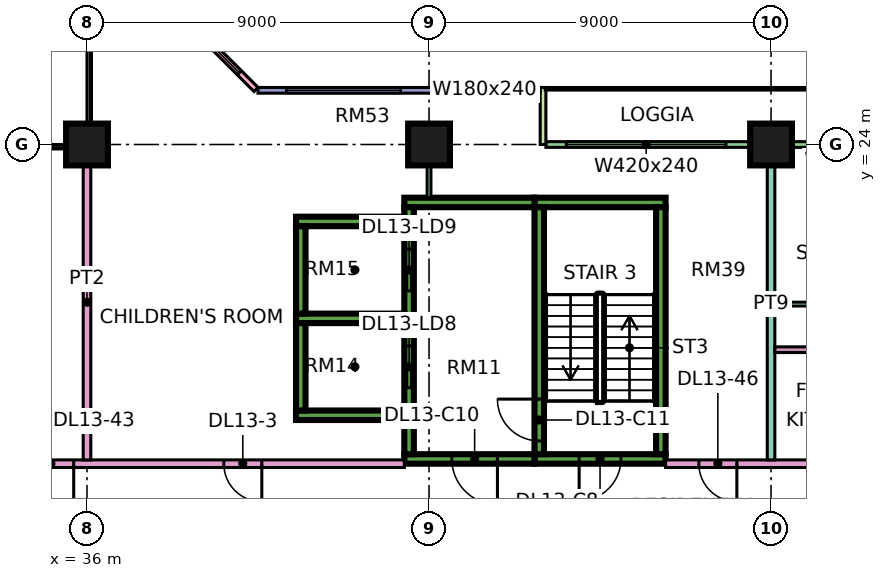
"""IFC4 building model, lengths in metres.
Left out: names, types, materials, properties, quantities, classifications, styles, units other than length and angle.
Written with IfcOpenShell. Run it as: python <this file> out.ifc"""

import sys

from ifc_helpers import new_model, si_unit, direction, frame, frame_2d, origin, origin_2d, place, context, subcontext, project, spatial, rectangle, extrude, element, fill, save


model = new_model("IFC4")
c1 = context("Model", 3, precision=1e-05, world=origin(), true_north=direction((0.0, 1.0)))
c2 = subcontext(c1, "Body", "Model", "MODEL_VIEW")
j1 = project(units=[si_unit("LENGTHUNIT", "METRE"), si_unit("PLANEANGLEUNIT", "RADIAN")], contexts=[c1])
p1 = place(None, origin())
s1 = spatial("IfcSite", under=j1, at=p1, CompositionType="ELEMENT")
p2 = place(p1, origin())
s2 = spatial("IfcBuilding", under=s1, at=p2, CompositionType="ELEMENT")
p3 = place(p2, frame((0.0, 0.0, 63.9)))
s3 = spatial("IfcBuildingStorey", under=s2, at=p3, CompositionType="ELEMENT", Elevation=63.9)
for number, where, z_axis, x_axis in (
    (1, (36.0, 24.0, 0.0), (0.0, 0.0, 1.0), (1.0, 0.0, 0.0)),
    (2, (45.0, 24.0, 0.0), (0.0, 0.0, 1.0), (1.0, 0.0, 0.0)),
    (3, (54.0, 24.0, 0.0), (0.0, 0.0, 1.0), (1.0, 0.0, 0.0)),
):
    element("IfcColumn", number, at=place(p3, frame(where, z_axis=z_axis, x_axis=x_axis)), inside=s3, PredefinedType="COLUMN", context=c2, shape_type="SweptSolid", body=[
        extrude(rectangle(XDim=1.1, YDim=1.1, at=origin_2d()), origin(), (0.0, 0.0, 1.0), 3.75),
    ])
p4 = place(p3, frame((47.775, 15.725, 0.0), z_axis=(0.0, 0.0, 1.0), x_axis=(1.0, 0.0, 0.0)))
e4 = element("IfcWall", 4, at=p4, inside=s3, PredefinedType="SHEAR", context=c2, shape_type="SweptSolid", body=[
    extrude(rectangle(XDim=3.45, YDim=0.25, at=frame_2d((1.725, 0.0))), origin(), (0.0, 0.0, 1.0), 3.75),
])
p5 = place(p4, frame((1.175, 0.0, 0.0)))
e5 = element("IfcOpeningElement", 5, at=p5, cuts=e4, PredefinedType="OPENING", context=c2, shape_type="SweptSolid", body=[
    extrude(rectangle(XDim=1.1, YDim=2.2, at=frame_2d((0.55, 1.1))), frame((0.0, 0.135, 0.0), z_axis=(0.0, -1.0, 0.0), x_axis=(1.0, 0.0, 0.0)), (0.0, 0.0, 1.0), 0.27),
])
p6 = place(p3, frame((47.775, 22.475, 0.0), z_axis=(0.0, 0.0, 1.0), x_axis=(1.0, 0.0, 0.0)))
e6 = element("IfcWall", 6, at=p6, inside=s3, PredefinedType="SHEAR", context=c2, shape_type="SweptSolid", body=[
    extrude(rectangle(XDim=3.45, YDim=0.25, at=frame_2d((1.725, 0.0))), origin(), (0.0, 0.0, 1.0), 3.75),
])
p7 = place(p3, frame((47.9, 15.85, 0.0), z_axis=(0.0, 0.0, 1.0), x_axis=(0.0, 1.0, 0.0)))
e7 = element("IfcWall", 7, at=p7, inside=s3, PredefinedType="SHEAR", context=c2, shape_type="SweptSolid", body=[
    extrude(rectangle(XDim=6.5, YDim=0.25, at=frame_2d((3.25, 0.0))), origin(), (0.0, 0.0, 1.0), 3.75),
])
p8 = place(p7, frame((0.35, 0.0, 0.0)))
e8 = element("IfcOpeningElement", 8, at=p8, cuts=e7, PredefinedType="OPENING", context=c2, shape_type="SweptSolid", body=[
    extrude(rectangle(XDim=1.1, YDim=2.2, at=frame_2d((0.55, 1.1))), frame((0.0, 0.135, 0.0), z_axis=(0.0, -1.0, 0.0), x_axis=(1.0, 0.0, 0.0)), (0.0, 0.0, 1.0), 0.27),
])
p9 = place(p3, frame((51.1, 15.85, 0.0), z_axis=(0.0, 0.0, 1.0), x_axis=(0.0, 1.0, 0.0)))
e9 = element("IfcWall", 9, at=p9, inside=s3, PredefinedType="SHEAR", context=c2, shape_type="SweptSolid", body=[
    extrude(rectangle(XDim=6.5, YDim=0.25, at=frame_2d((3.25, 0.0))), origin(), (0.0, 0.0, 1.0), 3.75),
])
p10 = place(p3, frame((44.35, 15.725, 0.0), z_axis=(0.0, 0.0, 1.0), x_axis=(1.0, 0.0, 0.0)))
e10 = element("IfcWall", 10, at=p10, inside=s3, PredefinedType="SHEAR", context=c2, shape_type="SweptSolid", body=[
    extrude(rectangle(XDim=3.425, YDim=0.25, at=frame_2d((1.712, 0.0))), origin(), (0.0, 0.0, 1.0), 3.75),
])
p11 = place(p10, frame((1.25, 0.0, 0.0)))
e11 = element("IfcOpeningElement", 11, at=p11, cuts=e10, PredefinedType="OPENING", context=c2, shape_type="SweptSolid", body=[
    extrude(rectangle(XDim=1.2, YDim=2.2, at=frame_2d((0.6, 1.1))), frame((0.0, 0.135, 0.0), z_axis=(0.0, -1.0, 0.0), x_axis=(1.0, 0.0, 0.0)), (0.0, 0.0, 1.0), 0.27),
])
p12 = place(p3, frame((44.35, 22.475, 0.0), z_axis=(0.0, 0.0, 1.0), x_axis=(1.0, 0.0, 0.0)))
e12 = element("IfcWall", 12, at=p12, inside=s3, PredefinedType="SHEAR", context=c2, shape_type="SweptSolid", body=[
    extrude(rectangle(XDim=3.425, YDim=0.25, at=frame_2d((1.712, 0.0))), origin(), (0.0, 0.0, 1.0), 3.75),
])
p13 = place(p3, frame((44.475, 15.85, 0.0), z_axis=(0.0, 0.0, 1.0), x_axis=(0.0, 1.0, 0.0)))
e13 = element("IfcWall", 13, at=p13, inside=s3, PredefinedType="SHEAR", context=c2, shape_type="SweptSolid", body=[
    extrude(rectangle(XDim=6.5, YDim=0.25, at=frame_2d((3.25, 0.0))), origin(), (0.0, 0.0, 1.0), 3.75),
])
p14 = place(p13, frame((1.75, 0.0, 0.0)))
e14 = element("IfcOpeningElement", 14, at=p14, cuts=e13, PredefinedType="OPENING", context=c2, shape_type="SweptSolid", body=[
    extrude(rectangle(XDim=1.1, YDim=2.2, at=frame_2d((0.55, 1.1))), frame((0.0, 0.135, 0.0), z_axis=(0.0, -1.0, 0.0), x_axis=(1.0, 0.0, 0.0)), (0.0, 0.0, 1.0), 0.27),
])
p15 = place(p13, frame((4.3, 0.0, 0.0)))
e15 = element("IfcOpeningElement", 15, at=p15, cuts=e13, PredefinedType="OPENING", context=c2, shape_type="SweptSolid", body=[
    extrude(rectangle(XDim=1.1, YDim=2.2, at=frame_2d((0.55, 1.1))), frame((0.0, 0.135, 0.0), z_axis=(0.0, -1.0, 0.0), x_axis=(1.0, 0.0, 0.0)), (0.0, 0.0, 1.0), 0.27),
])
for number, where, z_axis, x_axis in (
    (16, (41.5, 16.875, 0.0), (0.0, 0.0, 1.0), (1.0, 0.0, 0.0)),
    (17, (41.5, 19.425, 0.0), (0.0, 0.0, 1.0), (1.0, 0.0, 0.0)),
    (18, (41.5, 21.975, 0.0), (0.0, 0.0, 1.0), (1.0, 0.0, 0.0)),
):
    element("IfcWall", number, at=place(p3, frame(where, z_axis=z_axis, x_axis=x_axis)), inside=s3, PredefinedType="SHEAR", context=c2, shape_type="SweptSolid", body=[
        extrude(rectangle(XDim=2.85, YDim=0.25, at=frame_2d((1.425, 0.0))), origin(), (0.0, 0.0, 1.0), 3.75),
    ])
for number, where, z_axis, x_axis in (
    (19, (41.625, 17.0, 0.0), (0.0, 0.0, 1.0), (0.0, 1.0, 0.0)),
    (20, (41.625, 19.55, 0.0), (0.0, 0.0, 1.0), (0.0, 1.0, 0.0)),
):
    element("IfcWall", number, at=place(p3, frame(where, z_axis=z_axis, x_axis=x_axis)), inside=s3, PredefinedType="SHEAR", context=c2, shape_type="SweptSolid", body=[
        extrude(rectangle(XDim=2.3, YDim=0.25, at=frame_2d((1.15, 0.0))), origin(), (0.0, 0.0, 1.0), 3.75),
    ])
p16 = place(p3, frame((59.925, 24.0, 0.0), z_axis=(0.0, 0.0, 1.0), x_axis=(-1.0, 0.0, 0.0)))
e21 = element("IfcWall", 21, at=p16, inside=s3, PredefinedType="SOLIDWALL", context=c2, shape_type="SweptSolid", body=[
    extrude(rectangle(XDim=11.85, YDim=0.15, at=frame_2d((5.925, 0.0))), origin(), (0.0, 0.0, 1.0), 3.35),
])
p17 = place(p16, frame((0.562, 0.0, 0.45)))
e22 = element("IfcOpeningElement", 22, at=p17, cuts=e21, PredefinedType="OPENING", context=c2, shape_type="SweptSolid", body=[
    extrude(rectangle(XDim=1.8, YDim=2.4, at=frame_2d((0.9, 1.2))), frame((0.0, 0.085, 0.0), z_axis=(0.0, -1.0, 0.0), x_axis=(1.0, 0.0, 0.0)), (0.0, 0.0, 1.0), 0.17),
])
p18 = place(p16, frame((3.5, 0.0, 0.45)))
e23 = element("IfcOpeningElement", 23, at=p18, cuts=e21, PredefinedType="OPENING", context=c2, shape_type="SweptSolid", body=[
    extrude(rectangle(XDim=1.2, YDim=2.4, at=frame_2d((0.6, 1.2))), frame((0.0, 0.085, 0.0), z_axis=(0.0, -1.0, 0.0), x_axis=(1.0, 0.0, 0.0)), (0.0, 0.0, 1.0), 0.17),
])
p19 = place(p16, frame((7.113, 0.0, 0.45)))
e24 = element("IfcOpeningElement", 24, at=p19, cuts=e21, PredefinedType="OPENING", context=c2, shape_type="SweptSolid", body=[
    extrude(rectangle(XDim=4.2, YDim=2.4, at=frame_2d((2.1, 1.2))), frame((0.0, 0.085, 0.0), z_axis=(0.0, -1.0, 0.0), x_axis=(1.0, 0.0, 0.0)), (0.0, 0.0, 1.0), 0.17),
])
p20 = place(p3, frame((48.0, 25.5, 0.0), z_axis=(0.0, 0.0, 1.0), x_axis=(0.0, -1.0, 0.0)))
e25 = element("IfcWall", 25, at=p20, inside=s3, PredefinedType="SOLIDWALL", context=c2, shape_type="SweptSolid", body=[
    extrude(rectangle(XDim=1.5, YDim=0.15, at=frame_2d((0.75, 0.0))), origin(), (0.0, 0.0, 1.0), 3.35),
])
p21 = place(p3, frame((47.925, 25.425, 0.0), z_axis=(0.0, 0.0, 1.0), x_axis=(-1.0, 0.0, 0.0)))
e26 = element("IfcWall", 26, at=p21, inside=s3, PredefinedType="SOLIDWALL", context=c2, shape_type="SweptSolid", body=[
    extrude(rectangle(XDim=7.425, YDim=0.15, at=frame_2d((3.712, 0.0))), origin(), (0.0, 0.0, 1.0), 3.35),
])
p22 = place(p21, frame((0.562, 0.0, 0.45)))
e27 = element("IfcOpeningElement", 27, at=p22, cuts=e26, PredefinedType="OPENING", context=c2, shape_type="SweptSolid", body=[
    extrude(rectangle(XDim=1.8, YDim=2.4, at=frame_2d((0.9, 1.2))), frame((0.0, 0.085, 0.0), z_axis=(0.0, -1.0, 0.0), x_axis=(1.0, 0.0, 0.0)), (0.0, 0.0, 1.0), 0.17),
])
p23 = place(p21, frame((3.675, 0.0, 0.45)))
e28 = element("IfcOpeningElement", 28, at=p23, cuts=e26, PredefinedType="OPENING", context=c2, shape_type="SweptSolid", body=[
    extrude(rectangle(XDim=3.0, YDim=2.4, at=frame_2d((1.5, 1.2))), frame((0.0, 0.085, 0.0), z_axis=(0.0, -1.0, 0.0), x_axis=(1.0, 0.0, 0.0)), (0.0, 0.0, 1.0), 0.17),
])
p24 = place(p3, frame((40.447, 25.447, 0.0), z_axis=(0.0, 0.0, 1.0), x_axis=(-0.707106781187, 0.707106781187, 0.0)))
e29 = element("IfcWall", 29, at=p24, inside=s3, PredefinedType="SOLIDWALL", context=c2, shape_type="SweptSolid", body=[
    extrude(rectangle(XDim=4.243, YDim=0.15, at=frame_2d((2.121, 0.0))), origin(), (0.0, 0.0, 1.0), 3.35),
])
p25 = place(p24, frame((0.621, 0.0, 0.45)))
e30 = element("IfcOpeningElement", 30, at=p25, cuts=e29, PredefinedType="OPENING", context=c2, shape_type="SweptSolid", body=[
    extrude(rectangle(XDim=3.0, YDim=2.4, at=frame_2d((1.5, 1.2))), frame((0.0, 0.085, 0.0), z_axis=(0.0, -1.0, 0.0), x_axis=(1.0, 0.0, 0.0)), (0.0, 0.0, 1.0), 0.17),
])
p26 = place(p3, frame((34.0, 15.6, 0.0), z_axis=(0.0, 0.0, 1.0), x_axis=(1.0, 0.0, 0.0)))
e31 = element("IfcWall", 31, at=p26, inside=s3, PredefinedType="PARTITIONING", context=c2, shape_type="SweptSolid", body=[
    extrude(rectangle(XDim=10.35, YDim=0.2, at=frame_2d((5.175, 0.0))), origin(), (0.0, 0.0, 1.0), 3.35),
])
p27 = place(p26, frame((5.6, 0.0, 0.0)))
e32 = element("IfcOpeningElement", 32, at=p27, cuts=e31, PredefinedType="OPENING", context=c2, shape_type="SweptSolid", body=[
    extrude(rectangle(XDim=1.0, YDim=2.1, at=frame_2d((0.5, 1.05))), frame((0.0, 0.11, 0.0), z_axis=(0.0, -1.0, 0.0), x_axis=(1.0, 0.0, 0.0)), (0.0, 0.0, 1.0), 0.22),
])
p28 = place(p26, frame((0.45, 0.0, 0.0)))
e33 = element("IfcOpeningElement", 33, at=p28, cuts=e31, PredefinedType="OPENING", context=c2, shape_type="SweptSolid", body=[
    extrude(rectangle(XDim=1.2, YDim=2.1, at=frame_2d((0.6, 1.05))), frame((0.0, 0.11, 0.0), z_axis=(0.0, -1.0, 0.0), x_axis=(1.0, 0.0, 0.0)), (0.0, 0.0, 1.0), 0.22),
])
p29 = place(p3, frame((36.0, 15.7, 0.0), z_axis=(0.0, 0.0, 1.0), x_axis=(0.0, 1.0, 0.0)))
e34 = element("IfcWall", 34, at=p29, inside=s3, PredefinedType="PARTITIONING", context=c2, shape_type="SweptSolid", body=[
    extrude(rectangle(XDim=8.3, YDim=0.2, at=frame_2d((4.15, 0.0))), origin(), (0.0, 0.0, 1.0), 3.35),
])
p30 = place(p3, frame((45.0, 22.6, 0.0), z_axis=(0.0, 0.0, 1.0), x_axis=(0.0, 1.0, 0.0)))
e35 = element("IfcWall", 35, at=p30, inside=s3, PredefinedType="PARTITIONING", context=c2, shape_type="SweptSolid", body=[
    extrude(rectangle(XDim=1.4, YDim=0.1, at=frame_2d((0.7, 0.0))), origin(), (0.0, 0.0, 1.0), 3.35),
])
p31 = place(p3, frame((51.225, 15.6, 0.0), z_axis=(0.0, 0.0, 1.0), x_axis=(1.0, 0.0, 0.0)))
e36 = element("IfcWall", 36, at=p31, inside=s3, PredefinedType="PARTITIONING", context=c2, shape_type="SweptSolid", body=[
    extrude(rectangle(XDim=22.125, YDim=0.2, at=frame_2d((11.062, 0.0))), origin(), (0.0, 0.0, 1.0), 3.35),
])
p32 = place(p31, frame((18.725, 0.0, 0.0)))
e37 = element("IfcOpeningElement", 37, at=p32, cuts=e36, PredefinedType="OPENING", context=c2, shape_type="SweptSolid", body=[
    extrude(rectangle(XDim=1.0, YDim=2.1, at=frame_2d((0.5, 1.05))), frame((0.0, 0.11, 0.0), z_axis=(0.0, -1.0, 0.0), x_axis=(1.0, 0.0, 0.0)), (0.0, 0.0, 1.0), 0.22),
])
p33 = place(p31, frame((0.875, 0.0, 0.0)))
e38 = element("IfcOpeningElement", 38, at=p33, cuts=e36, PredefinedType="OPENING", context=c2, shape_type="SweptSolid", body=[
    extrude(rectangle(XDim=1.0, YDim=2.1, at=frame_2d((0.5, 1.05))), frame((0.0, 0.11, 0.0), z_axis=(0.0, -1.0, 0.0), x_axis=(1.0, 0.0, 0.0)), (0.0, 0.0, 1.0), 0.22),
])
p34 = place(p3, frame((54.0, 15.7, 0.0), z_axis=(0.0, 0.0, 1.0), x_axis=(0.0, 1.0, 0.0)))
e39 = element("IfcWall", 39, at=p34, inside=s3, PredefinedType="PARTITIONING", context=c2, shape_type="SweptSolid", body=[
    extrude(rectangle(XDim=8.226, YDim=0.2, at=frame_2d((4.113, 0.0))), origin(), (0.0, 0.0, 1.0), 3.35),
])
p35 = place(p3, frame((54.1, 18.6, 0.0), z_axis=(0.0, 0.0, 1.0), x_axis=(1.0, 0.0, 0.0)))
e40 = element("IfcWall", 40, at=p35, inside=s3, PredefinedType="PARTITIONING", context=c2, shape_type="SweptSolid", body=[
    extrude(rectangle(XDim=5.675, YDim=0.15, at=frame_2d((2.837, 0.0))), origin(), (0.0, 0.0, 1.0), 3.35),
])
p36 = place(p35, frame((0.95, 0.0, 0.0)))
e41 = element("IfcOpeningElement", 41, at=p36, cuts=e40, PredefinedType="OPENING", context=c2, shape_type="SweptSolid", body=[
    extrude(rectangle(XDim=0.9, YDim=2.1, at=frame_2d((0.45, 1.05))), frame((0.0, 0.085, 0.0), z_axis=(0.0, -1.0, 0.0), x_axis=(1.0, 0.0, 0.0)), (0.0, 0.0, 1.0), 0.17),
])
p37 = place(p3, frame((54.1, 19.8, 0.0), z_axis=(0.0, 0.0, 1.0), x_axis=(1.0, 0.0, 0.0)))
e42 = element("IfcWall", 42, at=p37, inside=s3, PredefinedType="PARTITIONING", context=c2, shape_type="SweptSolid", body=[
    extrude(rectangle(XDim=2.85, YDim=0.1, at=frame_2d((1.425, 0.0))), origin(), (0.0, 0.0, 1.0), 3.35),
])
p38 = place(p19, origin())
e43 = element("IfcWindow", 43, at=p38, inside=s3, PartitioningType="SINGLE_PANEL", PredefinedType="WINDOW", context=c2, shape_type="SweptSolid", body=[
    extrude(rectangle(XDim=4.2, YDim=2.4, at=frame_2d((2.1, 1.2))), frame((0.0, 0.03, 0.0), z_axis=(0.0, -1.0, 0.0), x_axis=(1.0, 0.0, 0.0)), (0.0, 0.0, 1.0), 0.06),
])
fill(e24, e43)
p39 = place(p22, origin())
e44 = element("IfcWindow", 44, at=p39, inside=s3, PartitioningType="SINGLE_PANEL", PredefinedType="WINDOW", context=c2, shape_type="SweptSolid", body=[
    extrude(rectangle(XDim=1.8, YDim=2.4, at=frame_2d((0.9, 1.2))), frame((0.0, 0.03, 0.0), z_axis=(0.0, -1.0, 0.0), x_axis=(1.0, 0.0, 0.0)), (0.0, 0.0, 1.0), 0.06),
])
fill(e27, e44)
p40 = place(p23, origin())
e45 = element("IfcWindow", 45, at=p40, inside=s3, PartitioningType="SINGLE_PANEL", PredefinedType="WINDOW", context=c2, shape_type="SweptSolid", body=[
    extrude(rectangle(XDim=3.0, YDim=2.4, at=frame_2d((1.5, 1.2))), frame((0.0, 0.03, 0.0), z_axis=(0.0, -1.0, 0.0), x_axis=(1.0, 0.0, 0.0)), (0.0, 0.0, 1.0), 0.06),
])
fill(e28, e45)
p41 = place(p25, origin())
e46 = element("IfcWindow", 46, at=p41, inside=s3, PartitioningType="SINGLE_PANEL", PredefinedType="WINDOW", context=c2, shape_type="SweptSolid", body=[
    extrude(rectangle(XDim=3.0, YDim=2.4, at=frame_2d((1.5, 1.2))), frame((0.0, 0.03, 0.0), z_axis=(0.0, -1.0, 0.0), x_axis=(1.0, 0.0, 0.0)), (0.0, 0.0, 1.0), 0.06),
])
fill(e30, e46)
p42 = place(p5, frame((1.1, 0.0, 0.0), z_axis=(0.0, 0.0, 1.0), x_axis=(-1.0, 0.0, 0.0)))
e47 = element("IfcDoor", 47, at=p42, inside=s3, OperationType="SINGLE_SWING_LEFT", PredefinedType="DOOR", context=c2, shape_type="SweptSolid", body=[
    extrude(rectangle(XDim=1.1, YDim=2.2, at=frame_2d((0.55, 1.1))), frame((0.0, 0.025, 0.0), z_axis=(0.0, -1.0, 0.0), x_axis=(1.0, 0.0, 0.0)), (0.0, 0.0, 1.0), 0.05),
])
fill(e5, e47)
p43 = place(p11, origin())
e48 = element("IfcDoor", 48, at=p43, inside=s3, OperationType="SINGLE_SWING_RIGHT", PredefinedType="DOOR", context=c2, shape_type="SweptSolid", body=[
    extrude(rectangle(XDim=1.2, YDim=2.2, at=frame_2d((0.6, 1.1))), frame((0.0, 0.025, 0.0), z_axis=(0.0, -1.0, 0.0), x_axis=(1.0, 0.0, 0.0)), (0.0, 0.0, 1.0), 0.05),
])
fill(e11, e48)
p44 = place(p8, frame((1.1, 0.0, 0.0), z_axis=(0.0, 0.0, 1.0), x_axis=(-1.0, 0.0, 0.0)))
e49 = element("IfcDoor", 49, at=p44, inside=s3, OperationType="SINGLE_SWING_RIGHT", PredefinedType="DOOR", context=c2, shape_type="SweptSolid", body=[
    extrude(rectangle(XDim=1.1, YDim=2.2, at=frame_2d((0.55, 1.1))), frame((0.0, 0.025, 0.0), z_axis=(0.0, -1.0, 0.0), x_axis=(1.0, 0.0, 0.0)), (0.0, 0.0, 1.0), 0.05),
])
fill(e8, e49)
p45 = place(p14, origin())
e50 = element("IfcDoor", 50, at=p45, inside=s3, OperationType="DOUBLE_DOOR_SLIDING", PredefinedType="DOOR", context=c2, shape_type="SweptSolid", body=[
    extrude(rectangle(XDim=1.1, YDim=2.2, at=frame_2d((0.55, 1.1))), frame((0.0, 0.025, 0.0), z_axis=(0.0, -1.0, 0.0), x_axis=(1.0, 0.0, 0.0)), (0.0, 0.0, 1.0), 0.05),
])
fill(e14, e50)
p46 = place(p15, origin())
e51 = element("IfcDoor", 51, at=p46, inside=s3, OperationType="DOUBLE_DOOR_SLIDING", PredefinedType="DOOR", context=c2, shape_type="SweptSolid", body=[
    extrude(rectangle(XDim=1.1, YDim=2.2, at=frame_2d((0.55, 1.1))), frame((0.0, 0.025, 0.0), z_axis=(0.0, -1.0, 0.0), x_axis=(1.0, 0.0, 0.0)), (0.0, 0.0, 1.0), 0.05),
])
fill(e15, e51)
p47 = place(p27, origin())
e52 = element("IfcDoor", 52, at=p47, inside=s3, OperationType="SINGLE_SWING_RIGHT", PredefinedType="DOOR", context=c2, shape_type="SweptSolid", body=[
    extrude(rectangle(XDim=1.0, YDim=2.1, at=frame_2d((0.5, 1.05))), frame((0.0, 0.025, 0.0), z_axis=(0.0, -1.0, 0.0), x_axis=(1.0, 0.0, 0.0)), (0.0, 0.0, 1.0), 0.05),
])
fill(e32, e52)
p48 = place(p28, origin())
e53 = element("IfcDoor", 53, at=p48, inside=s3, OperationType="SINGLE_SWING_RIGHT", PredefinedType="DOOR", context=c2, shape_type="SweptSolid", body=[
    extrude(rectangle(XDim=1.2, YDim=2.1, at=frame_2d((0.6, 1.05))), frame((0.0, 0.025, 0.0), z_axis=(0.0, -1.0, 0.0), x_axis=(1.0, 0.0, 0.0)), (0.0, 0.0, 1.0), 0.05),
])
fill(e33, e53)
p49 = place(p33, origin())
e54 = element("IfcDoor", 54, at=p49, inside=s3, OperationType="SINGLE_SWING_RIGHT", PredefinedType="DOOR", context=c2, shape_type="SweptSolid", body=[
    extrude(rectangle(XDim=1.0, YDim=2.1, at=frame_2d((0.5, 1.05))), frame((0.0, 0.025, 0.0), z_axis=(0.0, -1.0, 0.0), x_axis=(1.0, 0.0, 0.0)), (0.0, 0.0, 1.0), 0.05),
])
fill(e38, e54)
save(model, sys.argv[1])
